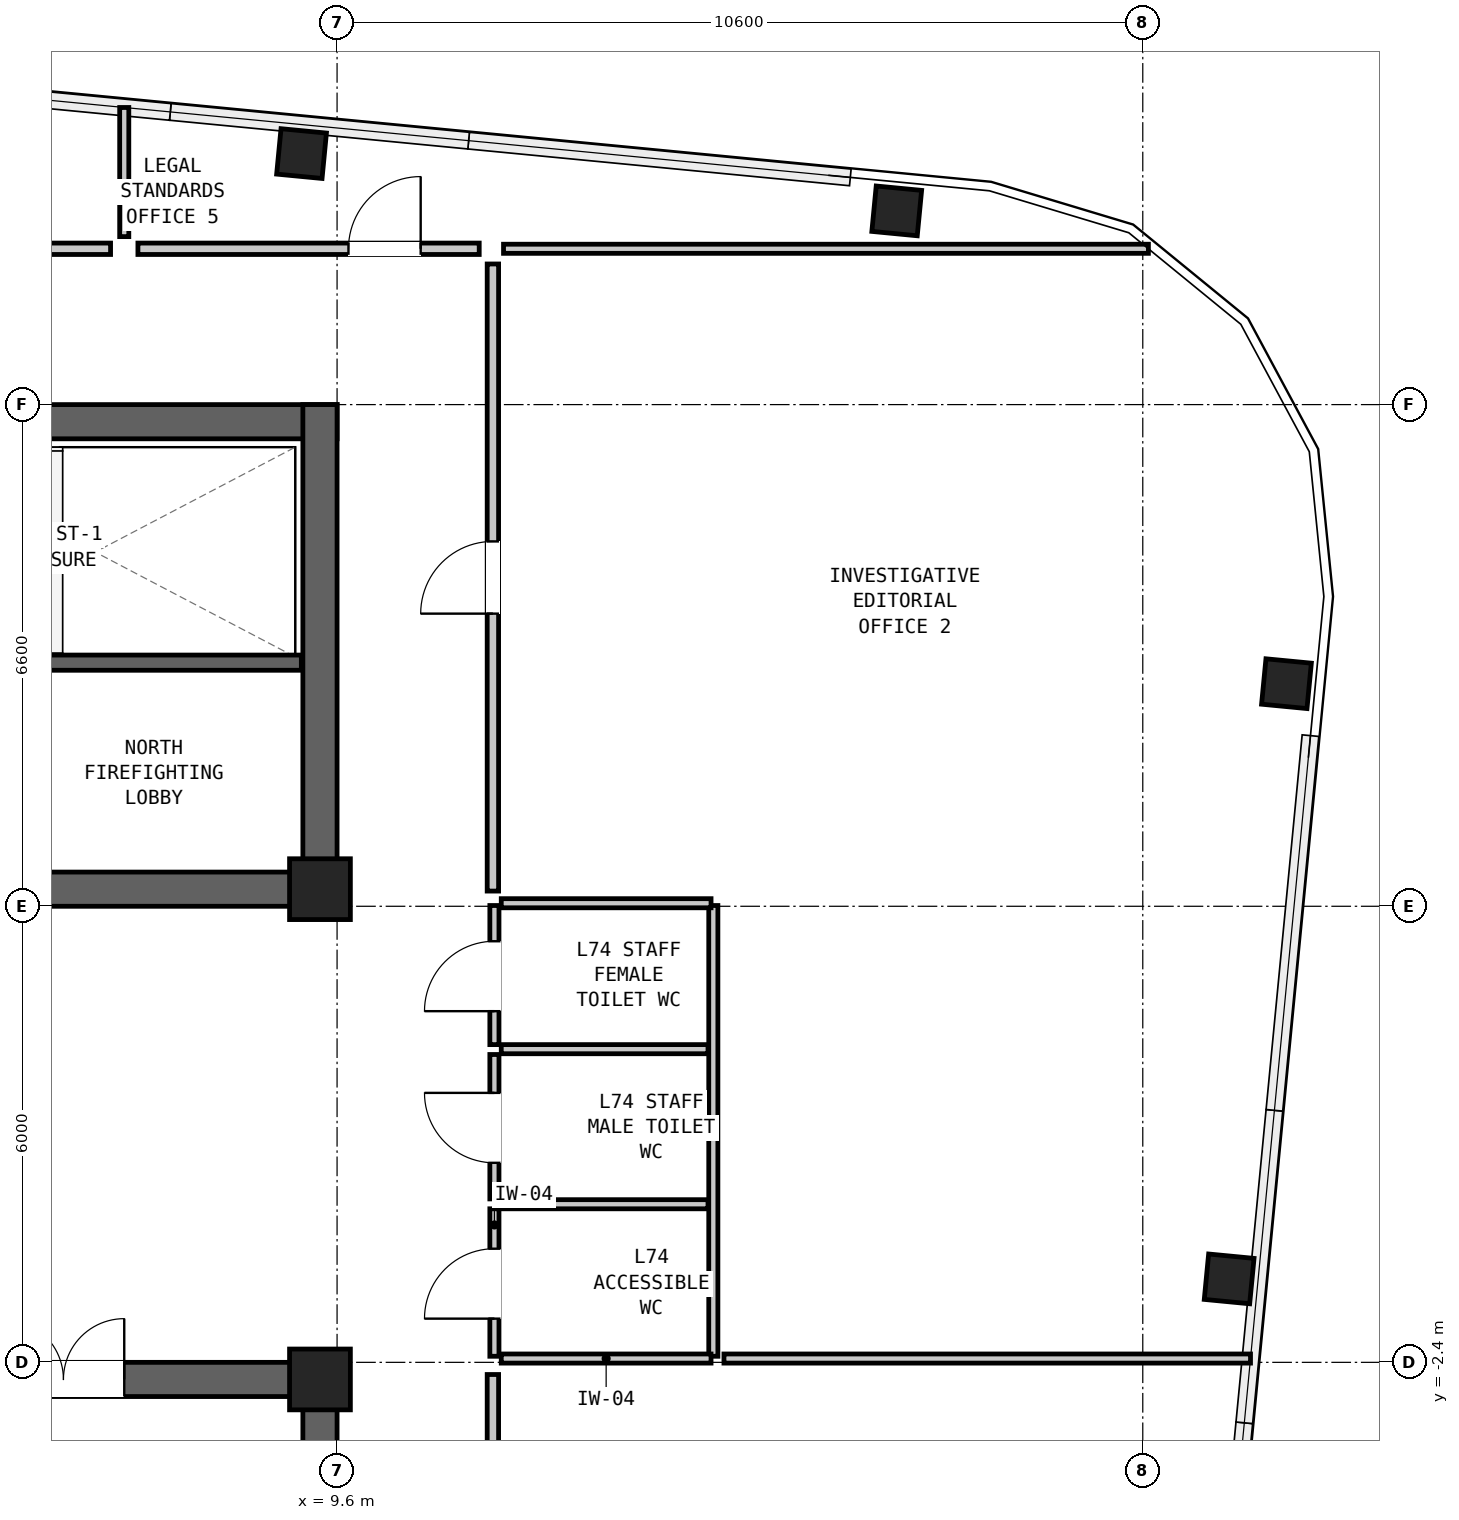
"""IFC4 building model, lengths in metres.
Left out: names, types, materials, properties, quantities, classifications, styles, units other than length and angle.
Written with IfcOpenShell. Run it as: python <this file> out.ifc"""

import sys

from ifc_helpers import new_model, si_unit, direction, frame, frame_2d, origin, origin_2d, place, context, subcontext, project, spatial, rectangle, hollow_rectangle, extrude, element, fill, save


model = new_model("IFC4")
c1 = context("Model", 3, precision=1e-05, world=origin(), true_north=direction((0.0, 1.0)))
c2 = subcontext(c1, "Body", "Model", "MODEL_VIEW")
j1 = project(units=[si_unit("LENGTHUNIT", "METRE"), si_unit("PLANEANGLEUNIT", "RADIAN")], contexts=[c1])
p1 = place(None, origin())
s1 = spatial("IfcSite", under=j1, at=p1, CompositionType="ELEMENT")
p2 = place(p1, origin())
s2 = spatial("IfcBuilding", under=s1, at=p2, CompositionType="ELEMENT")
p3 = place(p2, frame((0.0, 0.0, 252.0)))
s3 = spatial("IfcBuildingStorey", under=s2, at=p3, CompositionType="ELEMENT", Elevation=252.0)
p4 = place(p3, frame((-9.6, 9.975, 0.0), z_axis=(0.0, 0.0, 1.0), x_axis=(1.0, 0.0, 0.0)))
e1 = element("IfcWall", 1, at=p4, inside=s3, PredefinedType="SHEAR", context=c2, shape_type="SweptSolid", body=[
    extrude(rectangle(XDim=19.2, YDim=0.45, at=frame_2d((9.6, 0.0))), origin(), (0.0, 0.0, 1.0), 3.05),
])
p5 = place(p3, frame((-9.6, 3.825, 0.0), z_axis=(0.0, 0.0, 1.0), x_axis=(1.0, 0.0, 0.0)))
e2 = element("IfcWall", 2, at=p5, inside=s3, PredefinedType="SHEAR", context=c2, shape_type="SweptSolid", body=[
    extrude(rectangle(XDim=19.2, YDim=0.45, at=frame_2d((9.6, 0.0))), origin(), (0.0, 0.0, 1.0), 3.05),
])
p6 = place(p5, frame((14.2, 0.0, 0.0)))
e3 = element("IfcOpeningElement", 3, at=p6, cuts=e2, PredefinedType="OPENING", context=c2, shape_type="SweptSolid", body=[
    extrude(rectangle(XDim=1.1, YDim=2.08, at=frame_2d((0.55, 1.04))), frame((0.0, 0.237, 0.0), z_axis=(0.0, -1.0, 0.0), x_axis=(1.0, 0.0, 0.0)), (0.0, 0.0, 1.0), 0.474),
])
p7 = place(p5, frame((8.2, 0.0, 0.0)))
e4 = element("IfcOpeningElement", 4, at=p7, cuts=e2, PredefinedType="OPENING", context=c2, shape_type="SweptSolid", body=[
    extrude(rectangle(XDim=1.15, YDim=2.1, at=frame_2d((0.575, 1.05))), frame((0.0, 0.237, 0.0), z_axis=(0.0, -1.0, 0.0), x_axis=(1.0, 0.0, 0.0)), (0.0, 0.0, 1.0), 0.474),
])
p8 = place(p5, frame((2.5, 0.0, 0.0)))
e5 = element("IfcOpeningElement", 5, at=p8, cuts=e2, PredefinedType="OPENING", context=c2, shape_type="SweptSolid", body=[
    extrude(rectangle(XDim=1.2, YDim=2.1, at=frame_2d((0.6, 1.05))), frame((0.0, 0.237, 0.0), z_axis=(0.0, -1.0, 0.0), x_axis=(1.0, 0.0, 0.0)), (0.0, 0.0, 1.0), 0.474),
])
p9 = place(p3, frame((9.375, 3.6, 0.0), z_axis=(0.0, 0.0, 1.0), x_axis=(0.0, 1.0, 0.0)))
e6 = element("IfcWall", 6, at=p9, inside=s3, PredefinedType="SHEAR", context=c2, shape_type="SweptSolid", body=[
    extrude(rectangle(XDim=6.6, YDim=0.45, at=frame_2d((3.3, 0.0))), origin(), (0.0, 0.0, 1.0), 3.05),
])
p10 = place(p3, frame((-9.6, -2.625, 0.0), z_axis=(0.0, 0.0, 1.0), x_axis=(1.0, 0.0, 0.0)))
e7 = element("IfcWall", 7, at=p10, inside=s3, PredefinedType="SHEAR", context=c2, shape_type="SweptSolid", body=[
    extrude(rectangle(XDim=19.2, YDim=0.45, at=frame_2d((9.6, 0.0))), origin(), (0.0, 0.0, 1.0), 3.05),
])
p11 = place(p10, frame((3.8, 0.0, 0.0)))
e8 = element("IfcOpeningElement", 8, at=p11, cuts=e7, PredefinedType="OPENING", context=c2, shape_type="SweptSolid", body=[
    extrude(rectangle(XDim=1.1, YDim=2.08, at=frame_2d((0.55, 1.04))), frame((0.0, 0.237, 0.0), z_axis=(0.0, -1.0, 0.0), x_axis=(1.0, 0.0, 0.0)), (0.0, 0.0, 1.0), 0.474),
])
p12 = place(p10, frame((10.8, 0.0, 0.0)))
e9 = element("IfcOpeningElement", 9, at=p12, cuts=e7, PredefinedType="OPENING", context=c2, shape_type="SweptSolid", body=[
    extrude(rectangle(XDim=0.95, YDim=2.1, at=frame_2d((0.475, 1.05))), frame((0.0, 0.237, 0.0), z_axis=(0.0, -1.0, 0.0), x_axis=(1.0, 0.0, 0.0)), (0.0, 0.0, 1.0), 0.474),
])
p13 = place(p10, frame((14.8, 0.0, 0.0)))
e10 = element("IfcOpeningElement", 10, at=p13, cuts=e7, PredefinedType="OPENING", context=c2, shape_type="SweptSolid", body=[
    extrude(rectangle(XDim=1.6, YDim=2.12, at=frame_2d((0.8, 1.06))), frame((0.0, 0.237, 0.0), z_axis=(0.0, -1.0, 0.0), x_axis=(1.0, 0.0, 0.0)), (0.0, 0.0, 1.0), 0.474),
])
p14 = place(p3, frame((9.375, -9.0, 0.0), z_axis=(0.0, 0.0, 1.0), x_axis=(0.0, 1.0, 0.0)))
e11 = element("IfcWall", 11, at=p14, inside=s3, PredefinedType="SHEAR", context=c2, shape_type="SweptSolid", body=[
    extrude(rectangle(XDim=6.6, YDim=0.45, at=frame_2d((3.3, 0.0))), origin(), (0.0, 0.0, 1.0), 3.05),
])
for number, where, z_axis, x_axis in (
    (12, (21.336, -1.302, 0.0), (0.0, 0.0, 1.0), (0.096, 0.995, 0.0)),
    (13, (22.09, 6.528, 0.0), (0.0, 0.0, 1.0), (0.096, 0.995, 0.0)),
    (14, (16.963, 12.749, 0.0), (0.0, 0.0, 1.0), (0.995, -0.096, 0.0)),
    (15, (9.133, 13.502, 0.0), (0.0, 0.0, 1.0), (0.995, -0.096, 0.0)),
):
    element("IfcColumn", number, at=place(p3, frame(where, z_axis=z_axis, x_axis=x_axis)), inside=s3, PredefinedType="COLUMN", context=c2, shape_type="SweptSolid", body=[
        extrude(hollow_rectangle(XDim=0.6, YDim=0.6, WallThickness=0.04, at=origin_2d()), origin(), (0.0, 0.0, 1.0), 3.05),
    ])
for number, where, z_axis, x_axis in (
    (16, (9.375, 3.825, 0.0), (0.0, 0.0, 1.0), (1.0, 0.0, 0.0)),
    (17, (9.375, -2.625, 0.0), (0.0, 0.0, 1.0), (1.0, 0.0, 0.0)),
):
    element("IfcColumn", number, at=place(p3, frame(where, z_axis=z_axis, x_axis=x_axis)), inside=s3, PredefinedType="COLUMN", context=c2, shape_type="SweptSolid", body=[
        extrude(rectangle(XDim=0.8, YDim=0.8, at=origin_2d()), origin(), (0.0, 0.0, 1.0), 3.05),
    ])
p15 = place(p3, frame((2.36, 6.805, 0.0), z_axis=(0.0, 0.0, 1.0), x_axis=(1.0, 0.0, 0.0)))
e18 = element("IfcWall", 18, at=p15, inside=s3, PredefinedType="SHEAR", context=c2, shape_type="SweptSolid", body=[
    extrude(rectangle(XDim=6.77, YDim=0.2, at=frame_2d((3.385, 0.0))), origin(), (0.0, 0.0, 1.0), 2.86),
])
p16 = place(p15, frame((0.3, 0.0, 0.0)))
e19 = element("IfcOpeningElement", 19, at=p16, cuts=e18, PredefinedType="OPENING", context=c2, shape_type="SweptSolid", body=[
    extrude(rectangle(XDim=1.05, YDim=2.08, at=frame_2d((0.525, 1.04))), frame((0.0, 0.112, 0.0), z_axis=(0.0, -1.0, 0.0), x_axis=(1.0, 0.0, 0.0)), (0.0, 0.0, 1.0), 0.224),
])
p17 = place(p3, frame((11.67, -2.32, 0.0), z_axis=(0.0, 0.0, 1.0), x_axis=(0.0, 1.0, 0.0)))
e20 = element("IfcWall", 20, at=p17, inside=s3, PredefinedType="PARTITIONING", context=c2, shape_type="SweptSolid", body=[
    extrude(rectangle(XDim=1.94, YDim=0.12, at=frame_2d((0.97, 0.0))), origin(), (0.0, 0.0, 1.0), 2.86),
])
p18 = place(p17, frame((0.495, 0.0, 0.0)))
e21 = element("IfcOpeningElement", 21, at=p18, cuts=e20, PredefinedType="OPENING", context=c2, shape_type="SweptSolid", body=[
    extrude(rectangle(XDim=0.92, YDim=2.1, at=frame_2d((0.46, 1.05))), frame((0.0, 0.072, 0.0), z_axis=(0.0, -1.0, 0.0), x_axis=(1.0, 0.0, 0.0)), (0.0, 0.0, 1.0), 0.144),
])
p19 = place(p3, frame((11.67, -0.25, 0.0), z_axis=(0.0, 0.0, 1.0), x_axis=(0.0, 1.0, 0.0)))
e22 = element("IfcWall", 22, at=p19, inside=s3, PredefinedType="PARTITIONING", context=c2, shape_type="SweptSolid", body=[
    extrude(rectangle(XDim=1.9, YDim=0.12, at=frame_2d((0.95, 0.0))), origin(), (0.0, 0.0, 1.0), 2.86),
])
p20 = place(p19, frame((0.475, 0.0, 0.0)))
e23 = element("IfcOpeningElement", 23, at=p20, cuts=e22, PredefinedType="OPENING", context=c2, shape_type="SweptSolid", body=[
    extrude(rectangle(XDim=0.92, YDim=2.1, at=frame_2d((0.46, 1.05))), frame((0.0, 0.072, 0.0), z_axis=(0.0, -1.0, 0.0), x_axis=(1.0, 0.0, 0.0)), (0.0, 0.0, 1.0), 0.144),
])
p21 = place(p3, frame((11.67, 1.78, 0.0), z_axis=(0.0, 0.0, 1.0), x_axis=(0.0, 1.0, 0.0)))
e24 = element("IfcWall", 24, at=p21, inside=s3, PredefinedType="PARTITIONING", context=c2, shape_type="SweptSolid", body=[
    extrude(rectangle(XDim=1.83, YDim=0.12, at=frame_2d((0.915, 0.0))), origin(), (0.0, 0.0, 1.0), 2.86),
])
p22 = place(p21, frame((0.44, 0.0, 0.0)))
e25 = element("IfcOpeningElement", 25, at=p22, cuts=e24, PredefinedType="OPENING", context=c2, shape_type="SweptSolid", body=[
    extrude(rectangle(XDim=0.92, YDim=2.1, at=frame_2d((0.46, 1.05))), frame((0.0, 0.072, 0.0), z_axis=(0.0, -1.0, 0.0), x_axis=(1.0, 0.0, 0.0)), (0.0, 0.0, 1.0), 0.144),
])
p23 = place(p3, frame((14.55, -2.32, 0.0), z_axis=(0.0, 0.0, 1.0), x_axis=(0.0, 1.0, 0.0)))
e26 = element("IfcWall", 26, at=p23, inside=s3, PredefinedType="PARTITIONING", context=c2, shape_type="SweptSolid", body=[
    extrude(rectangle(XDim=5.93, YDim=0.12, at=frame_2d((2.965, 0.0))), origin(), (0.0, 0.0, 1.0), 2.86),
])
for number, where, z_axis, x_axis in (
    (27, (11.76, -2.35, 0.0), (0.0, 0.0, 1.0), (1.0, 0.0, 0.0)),
    (28, (11.76, 3.64, 0.0), (0.0, 0.0, 1.0), (1.0, 0.0, 0.0)),
):
    element("IfcWall", number, at=place(p3, frame(where, z_axis=z_axis, x_axis=x_axis)), inside=s3, PredefinedType="PARTITIONING", context=c2, shape_type="SweptSolid", body=[
        extrude(rectangle(XDim=2.76, YDim=0.12, at=frame_2d((1.38, 0.0))), origin(), (0.0, 0.0, 1.0), 1.981),
    ])
for number, where, z_axis, x_axis in (
    (29, (11.76, -0.32, 0.0), (0.0, 0.0, 1.0), (1.0, 0.0, 0.0)),
    (30, (11.76, 1.72, 0.0), (0.0, 0.0, 1.0), (1.0, 0.0, 0.0)),
):
    element("IfcWall", number, at=place(p3, frame(where, z_axis=z_axis, x_axis=x_axis)), inside=s3, PredefinedType="PARTITIONING", context=c2, shape_type="SweptSolid", body=[
        extrude(rectangle(XDim=2.72, YDim=0.12, at=frame_2d((1.36, 0.0))), origin(), (0.0, 0.0, 1.0), 2.86),
    ])
p24 = place(p3, frame((11.79, 12.25, 0.0), z_axis=(0.0, 0.0, 1.0), x_axis=(1.0, 0.0, 0.0)))
e31 = element("IfcWall", 31, at=p24, inside=s3, PredefinedType="PARTITIONING", context=c2, shape_type="SweptSolid", body=[
    extrude(rectangle(XDim=8.484, YDim=0.12, at=frame_2d((4.242, 0.0))), origin(), (0.0, 0.0, 1.0), 2.86),
])
p25 = place(p3, frame((6.8, 12.41, 0.0), z_axis=(0.0, 0.0, 1.0), x_axis=(0.0, 1.0, 0.0)))
e32 = element("IfcWall", 32, at=p25, inside=s3, PredefinedType="PARTITIONING", context=c2, shape_type="SweptSolid", body=[
    extrude(rectangle(XDim=1.699, YDim=0.12, at=frame_2d((0.85, 0.0))), origin(), (0.0, 0.0, 1.0), 2.86),
])
p26 = place(p3, frame((14.69, -2.35, 0.0), z_axis=(0.0, 0.0, 1.0), x_axis=(1.0, 0.0, 0.0)))
e33 = element("IfcWall", 33, at=p26, inside=s3, PredefinedType="PARTITIONING", context=c2, shape_type="SweptSolid", body=[
    extrude(rectangle(XDim=6.927, YDim=0.12, at=frame_2d((3.464, 0.0))), origin(), (0.0, 0.0, 1.0), 1.981),
])
p27 = place(p3, frame((2.98, 12.25, 0.0), z_axis=(0.0, 0.0, 1.0), x_axis=(1.0, 0.0, 0.0)))
e34 = element("IfcWall", 34, at=p27, inside=s3, PredefinedType="PARTITIONING", context=c2, shape_type="SweptSolid", body=[
    extrude(rectangle(XDim=3.64, YDim=0.15, at=frame_2d((1.82, 0.0))), origin(), (0.0, 0.0, 1.0), 2.86),
])
p28 = place(p27, frame((1.345, 0.0, 0.0)))
e35 = element("IfcOpeningElement", 35, at=p28, cuts=e34, PredefinedType="OPENING", context=c2, shape_type="SweptSolid", body=[
    extrude(rectangle(XDim=0.95, YDim=2.1, at=frame_2d((0.475, 1.05))), frame((0.0, 0.087, 0.0), z_axis=(0.0, -1.0, 0.0), x_axis=(1.0, 0.0, 0.0)), (0.0, 0.0, 1.0), 0.174),
])
p29 = place(p3, frame((6.98, 12.25, 0.0), z_axis=(0.0, 0.0, 1.0), x_axis=(1.0, 0.0, 0.0)))
e36 = element("IfcWall", 36, at=p29, inside=s3, PredefinedType="PARTITIONING", context=c2, shape_type="SweptSolid", body=[
    extrude(rectangle(XDim=4.49, YDim=0.15, at=frame_2d((2.245, 0.0))), origin(), (0.0, 0.0, 1.0), 2.86),
])
p30 = place(p29, frame((2.77, 0.0, 0.0)))
e37 = element("IfcOpeningElement", 37, at=p30, cuts=e36, PredefinedType="OPENING", context=c2, shape_type="SweptSolid", body=[
    extrude(rectangle(XDim=0.95, YDim=2.1, at=frame_2d((0.475, 1.05))), frame((0.0, 0.087, 0.0), z_axis=(0.0, -1.0, 0.0), x_axis=(1.0, 0.0, 0.0)), (0.0, 0.0, 1.0), 0.174),
])
p31 = place(p3, frame((11.65, -10.85, 0.0), z_axis=(0.0, 0.0, 1.0), x_axis=(0.0, 1.0, 0.0)))
e38 = element("IfcWall", 38, at=p31, inside=s3, PredefinedType="PARTITIONING", context=c2, shape_type="SweptSolid", body=[
    extrude(rectangle(XDim=8.29, YDim=0.15, at=frame_2d((4.145, 0.0))), origin(), (0.0, 0.0, 1.0), 2.86),
])
p32 = place(p31, frame((3.67, 0.0, 0.0)))
e39 = element("IfcOpeningElement", 39, at=p32, cuts=e38, PredefinedType="OPENING", context=c2, shape_type="SweptSolid", body=[
    extrude(rectangle(XDim=0.95, YDim=2.1, at=frame_2d((0.475, 1.05))), frame((0.0, 0.087, 0.0), z_axis=(0.0, -1.0, 0.0), x_axis=(1.0, 0.0, 0.0)), (0.0, 0.0, 1.0), 0.174),
])
p33 = place(p3, frame((11.65, 3.8, 0.0), z_axis=(0.0, 0.0, 1.0), x_axis=(0.0, 1.0, 0.0)))
e40 = element("IfcWall", 40, at=p33, inside=s3, PredefinedType="PARTITIONING", context=c2, shape_type="SweptSolid", body=[
    extrude(rectangle(XDim=8.25, YDim=0.15, at=frame_2d((4.125, 0.0))), origin(), (0.0, 0.0, 1.0), 2.86),
])
p34 = place(p33, frame((3.65, 0.0, 0.0)))
e41 = element("IfcOpeningElement", 41, at=p34, cuts=e40, PredefinedType="OPENING", context=c2, shape_type="SweptSolid", body=[
    extrude(rectangle(XDim=0.95, YDim=2.1, at=frame_2d((0.475, 1.05))), frame((0.0, 0.087, 0.0), z_axis=(0.0, -1.0, 0.0), x_axis=(1.0, 0.0, 0.0)), (0.0, 0.0, 1.0), 0.174),
])
p35 = place(p13, origin())
e42 = element("IfcDoor", 42, at=p35, inside=s3, OperationType="DOUBLE_DOOR_SINGLE_SWING", PredefinedType="DOOR", context=c2, shape_type="SweptSolid", body=[
    extrude(rectangle(XDim=1.6, YDim=2.12, at=frame_2d((0.8, 1.06))), frame((0.0, 0.025, 0.0), z_axis=(0.0, -1.0, 0.0), x_axis=(1.0, 0.0, 0.0)), (0.0, 0.0, 1.0), 0.05),
])
fill(e10, e42)
p36 = place(p18, origin())
e43 = element("IfcDoor", 43, at=p36, inside=s3, OperationType="SINGLE_SWING_LEFT", PredefinedType="DOOR", context=c2, shape_type="SweptSolid", body=[
    extrude(rectangle(XDim=0.92, YDim=2.1, at=frame_2d((0.46, 1.05))), frame((0.0, 0.025, 0.0), z_axis=(0.0, -1.0, 0.0), x_axis=(1.0, 0.0, 0.0)), (0.0, 0.0, 1.0), 0.05),
])
fill(e21, e43)
p37 = place(p20, origin())
e44 = element("IfcDoor", 44, at=p37, inside=s3, OperationType="SINGLE_SWING_RIGHT", PredefinedType="DOOR", context=c2, shape_type="SweptSolid", body=[
    extrude(rectangle(XDim=0.92, YDim=2.1, at=frame_2d((0.46, 1.05))), frame((0.0, 0.025, 0.0), z_axis=(0.0, -1.0, 0.0), x_axis=(1.0, 0.0, 0.0)), (0.0, 0.0, 1.0), 0.05),
])
fill(e23, e44)
p38 = place(p22, origin())
e45 = element("IfcDoor", 45, at=p38, inside=s3, OperationType="SINGLE_SWING_LEFT", PredefinedType="DOOR", context=c2, shape_type="SweptSolid", body=[
    extrude(rectangle(XDim=0.92, YDim=2.1, at=frame_2d((0.46, 1.05))), frame((0.0, 0.025, 0.0), z_axis=(0.0, -1.0, 0.0), x_axis=(1.0, 0.0, 0.0)), (0.0, 0.0, 1.0), 0.05),
])
fill(e25, e45)
p39 = place(p30, origin())
e46 = element("IfcDoor", 46, at=p39, inside=s3, OperationType="SINGLE_SWING_RIGHT", PredefinedType="DOOR", context=c2, shape_type="SweptSolid", body=[
    extrude(rectangle(XDim=0.95, YDim=2.1, at=frame_2d((0.475, 1.05))), frame((0.0, 0.025, 0.0), z_axis=(0.0, -1.0, 0.0), x_axis=(1.0, 0.0, 0.0)), (0.0, 0.0, 1.0), 0.05),
])
fill(e37, e46)
p40 = place(p34, origin())
e47 = element("IfcDoor", 47, at=p40, inside=s3, OperationType="SINGLE_SWING_LEFT", PredefinedType="DOOR", context=c2, shape_type="SweptSolid", body=[
    extrude(rectangle(XDim=0.95, YDim=2.1, at=frame_2d((0.475, 1.05))), frame((0.0, 0.025, 0.0), z_axis=(0.0, -1.0, 0.0), x_axis=(1.0, 0.0, 0.0)), (0.0, 0.0, 1.0), 0.05),
])
fill(e41, e47)
save(model, sys.argv[1])
